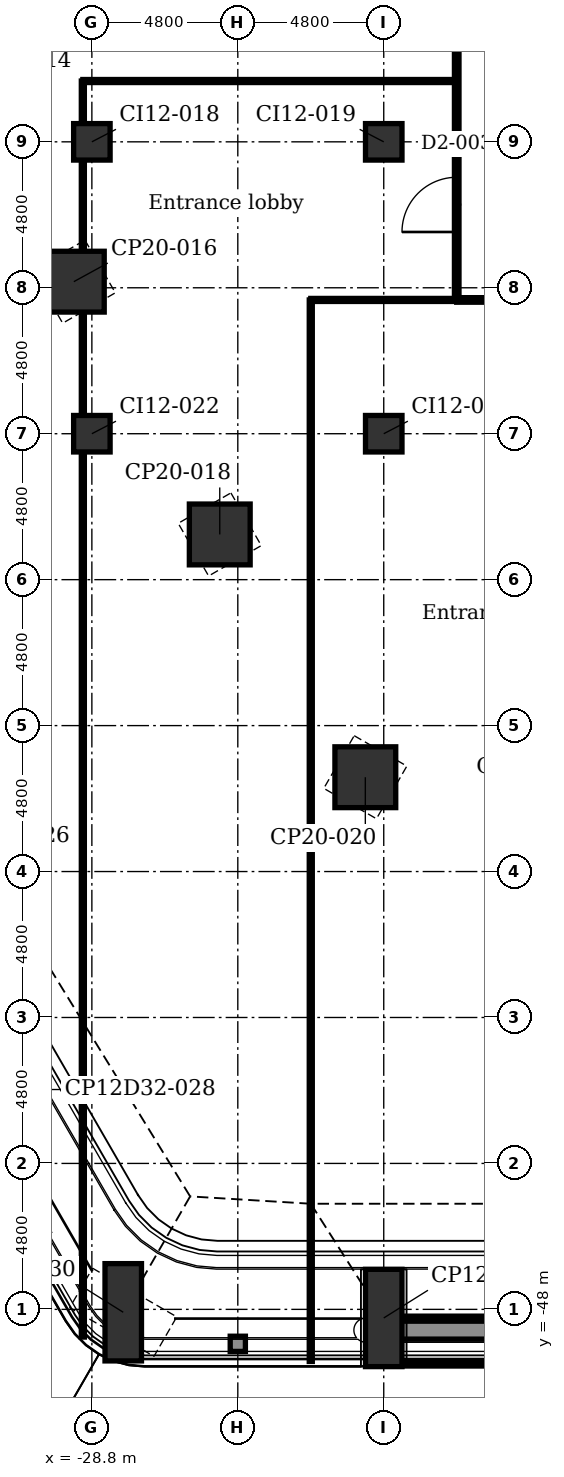
"""IFC4 building model, lengths in metres.
Left out: names, types, materials, properties, quantities, classifications, styles, units other than length and angle.
Written with IfcOpenShell. Run it as: python <this file> out.ifc"""

import sys

from ifc_helpers import new_model, si_unit, direction, frame, frame_2d, origin, origin_2d, place, context, subcontext, project, spatial, rectangle, extrude, element, fill, save


model = new_model("IFC4")
c1 = context("Model", 3, precision=1e-05, world=origin(), true_north=direction((0.0, 1.0)))
c2 = subcontext(c1, "Body", "Model", "MODEL_VIEW")
j1 = project(units=[si_unit("LENGTHUNIT", "METRE"), si_unit("PLANEANGLEUNIT", "RADIAN")], contexts=[c1])
p1 = place(None, origin())
s1 = spatial("IfcSite", under=j1, at=p1, CompositionType="ELEMENT")
p2 = place(p1, origin())
s2 = spatial("IfcBuilding", under=s1, at=p2, CompositionType="ELEMENT")
p3 = place(p2, origin())
s3 = spatial("IfcBuildingStorey", under=s2, at=p3, CompositionType="ELEMENT", Elevation=0.0)
for number, where, z_axis, x_axis in (
    (1, (-19.2, -48.283, -0.4), (0.0, 0.0, 1.0), (1.0, 0.0, 0.0)),
    (2, (-27.768, -48.095, -0.4), (0.0, 0.0, 1.0), (0.5, 0.866, 0.0)),
):
    element("IfcColumn", number, at=place(p3, frame(where, z_axis=z_axis, x_axis=x_axis)), inside=s3, PredefinedType="COLUMN", context=c2, shape_type="SweptSolid", body=[
        extrude(rectangle(XDim=1.2, YDim=3.2, at=origin_2d()), origin(), (0.0, 0.0, 1.0), 7.1),
    ])
for number, where, z_axis, x_axis in (
    (3, (-19.806, -30.498, -0.4), (0.0, 0.0, 1.0), (0.5, 0.866, 0.0)),
    (4, (-24.594, -22.513, -0.4), (0.0, 0.0, 1.0), (0.866, 0.5, 0.0)),
    (5, (-29.394, -14.199, -0.4), (0.0, 0.0, 1.0), (0.866, 0.5, 0.0)),
):
    element("IfcColumn", number, at=place(p3, frame(where, z_axis=z_axis, x_axis=x_axis)), inside=s3, PredefinedType="COLUMN", context=c2, shape_type="SweptSolid", body=[
        extrude(rectangle(XDim=2.0, YDim=2.0, at=origin_2d()), origin(), (0.0, 0.0, 1.0), 7.1),
    ])
for number, where, z_axis, x_axis in (
    (6, (-28.8, -19.2, -0.4), (0.0, 0.0, 1.0), (1.0, 0.0, 0.0)),
    (7, (-28.8, -9.6, -0.4), (0.0, 0.0, 1.0), (1.0, 0.0, 0.0)),
    (8, (-19.2, -19.2, -0.4), (0.0, 0.0, 1.0), (1.0, 0.0, 0.0)),
    (9, (-19.2, -9.6, -0.4), (0.0, 0.0, 1.0), (1.0, 0.0, 0.0)),
):
    element("IfcColumn", number, at=place(p3, frame(where, z_axis=z_axis, x_axis=x_axis)), inside=s3, PredefinedType="COLUMN", context=c2, shape_type="SweptSolid", body=[
        extrude(rectangle(XDim=1.2, YDim=1.2, at=origin_2d()), origin(), (0.0, 0.0, 1.0), 7.1),
    ])
p4 = place(p3, frame((-10.352, -48.303, 0.0), z_axis=(0.0, 0.0, 1.0), x_axis=(-1.0, 0.0, 0.0)))
e10 = element("IfcWall", 10, at=p4, inside=s3, PredefinedType="PARTITIONING", context=c2, shape_type="SweptSolid", body=[
    extrude(rectangle(XDim=8.246, YDim=0.16, at=frame_2d((4.123, 0.0))), origin(), (0.0, 0.0, 1.0), 6.7),
])
p5 = place(p4, frame((2.923, 0.0, 0.0)))
e11 = element("IfcOpeningElement", 11, at=p5, cuts=e10, PredefinedType="OPENING", context=c2, shape_type="SweptSolid", body=[
    extrude(rectangle(XDim=2.4, YDim=2.4, at=frame_2d((1.2, 1.2))), frame((0.0, 0.09, 0.0), z_axis=(0.0, -1.0, 0.0), x_axis=(1.0, 0.0, 0.0)), (0.0, 0.0, 1.0), 0.18),
])
p6 = place(p3, frame((-10.354, -49.783, 0.0), z_axis=(0.0, 0.0, 1.0), x_axis=(-1.0, 0.0, 0.0)))
e12 = element("IfcWall", 12, at=p6, inside=s3, PredefinedType="PARTITIONING", context=c2, shape_type="SweptSolid", body=[
    extrude(rectangle(XDim=8.242, YDim=0.16, at=frame_2d((4.121, 0.0))), origin(), (0.0, 0.0, 1.0), 6.7),
])
p7 = place(p6, frame((2.921, 0.0, 0.0)))
e13 = element("IfcOpeningElement", 13, at=p7, cuts=e12, PredefinedType="OPENING", context=c2, shape_type="SweptSolid", body=[
    extrude(rectangle(XDim=2.4, YDim=2.4, at=frame_2d((1.2, 1.2))), frame((0.0, 0.09, 0.0), z_axis=(0.0, -1.0, 0.0), x_axis=(1.0, 0.0, 0.0)), (0.0, 0.0, 1.0), 0.18),
])
p8 = place(p3, frame((-13.782, -48.683, 7.0), z_axis=(0.0, 0.0, 1.0), x_axis=(-1.0, 0.0, 0.0)))
e14 = element("IfcWall", 14, at=p8, inside=s3, PredefinedType="USERDEFINED", context=c2, shape_type="SweptSolid", body=[
    extrude(rectangle(XDim=6.0, YDim=0.6, at=frame_2d((3.0, 0.0))), origin(), (0.0, 0.0, 1.0), 0.7),
])
p9 = place(p3, frame((-23.75, -49.133, 0.0), z_axis=(0.0, 0.0, 1.0), x_axis=(-1.0, 0.0, 0.0)))
e15 = element("IfcWall", 15, at=p9, inside=s3, PredefinedType="SOLIDWALL", context=c2, shape_type="SweptSolid", body=[
    extrude(rectangle(XDim=0.5, YDim=0.5, at=frame_2d((0.25, 0.0))), origin(), (0.0, 0.0, 1.0), 6.4),
])
p10 = place(p3, frame((-16.8, -14.8, 0.0), z_axis=(0.0, 0.0, 1.0), x_axis=(0.0, 1.0, 0.0)))
e16 = element("IfcWall", 16, at=p10, inside=s3, PredefinedType="PARTITIONING", context=c2, shape_type="SweptSolid", body=[
    extrude(rectangle(XDim=10.85, YDim=0.15, at=frame_2d((5.425, 0.0))), origin(), (0.0, 0.0, 1.0), 6.7),
])
p11 = place(p10, frame((2.235, 0.0, 0.0)))
e17 = element("IfcOpeningElement", 17, at=p11, cuts=e16, PredefinedType="OPENING", context=c2, shape_type="SweptSolid", body=[
    extrude(rectangle(XDim=1.8, YDim=2.1, at=frame_2d((0.9, 1.05))), frame((0.0, 0.085, 0.0), z_axis=(0.0, -1.0, 0.0), x_axis=(1.0, 0.0, 0.0)), (0.0, 0.0, 1.0), 0.17),
])
p12 = place(p10, frame((8.6, 0.0, 0.0)))
e18 = element("IfcOpeningElement", 18, at=p12, cuts=e16, PredefinedType="OPENING", context=c2, shape_type="SweptSolid", body=[
    extrude(rectangle(XDim=1.0, YDim=2.1, at=frame_2d((0.5, 1.05))), frame((0.0, 0.085, 0.0), z_axis=(0.0, -1.0, 0.0), x_axis=(1.0, 0.0, 0.0)), (0.0, 0.0, 1.0), 0.17),
])
p13 = place(p3, frame((-21.6, -49.713, 0.0), z_axis=(0.0, 0.0, 1.0), x_axis=(0.0, 1.0, 0.0)))
e19 = element("IfcWall", 19, at=p13, inside=s3, PredefinedType="PARTITIONING", context=c2, shape_type="SweptSolid", body=[
    extrude(rectangle(XDim=34.913, YDim=0.1, at=frame_2d((17.457, 0.0))), origin(), (0.0, 0.0, 1.0), 6.7),
])
p14 = place(p3, frame((-29.097, -48.911, 0.0), z_axis=(0.0, 0.0, 1.0), x_axis=(0.0, 1.0, 0.0)))
e20 = element("IfcWall", 20, at=p14, inside=s3, PredefinedType="PARTITIONING", context=c2, shape_type="SweptSolid", body=[
    extrude(rectangle(XDim=41.311, YDim=0.1, at=frame_2d((20.655, 0.0))), origin(), (0.0, 0.0, 1.0), 6.7),
])
p15 = place(p3, frame((-21.6, -14.8, 0.0), z_axis=(0.0, 0.0, 1.0), x_axis=(1.0, 0.0, 0.0)))
e21 = element("IfcWall", 21, at=p15, inside=s3, PredefinedType="PARTITIONING", context=c2, shape_type="SweptSolid", body=[
    extrude(rectangle(XDim=4.8, YDim=0.1, at=frame_2d((2.4, 0.0))), origin(), (0.0, 0.0, 1.0), 6.7),
])
p16 = place(p3, frame((-16.8, -14.8, 0.0), z_axis=(0.0, 0.0, 1.0), x_axis=(1.0, 0.0, 0.0)))
e22 = element("IfcWall", 22, at=p16, inside=s3, PredefinedType="PARTITIONING", context=c2, shape_type="SweptSolid", body=[
    extrude(rectangle(XDim=33.6, YDim=0.15, at=frame_2d((16.8, 0.0))), origin(), (0.0, 0.0, 1.0), 6.7),
])
p17 = place(p16, frame((30.15, 0.0, 0.0)))
e23 = element("IfcOpeningElement", 23, at=p17, cuts=e22, PredefinedType="OPENING", context=c2, shape_type="SweptSolid", body=[
    extrude(rectangle(XDim=0.9, YDim=2.1, at=frame_2d((0.45, 1.05))), frame((0.0, 0.085, 0.0), z_axis=(0.0, -1.0, 0.0), x_axis=(1.0, 0.0, 0.0)), (0.0, 0.0, 1.0), 0.17),
])
p18 = place(p16, frame((32.55, 0.0, 0.0)))
e24 = element("IfcOpeningElement", 24, at=p18, cuts=e22, PredefinedType="OPENING", context=c2, shape_type="SweptSolid", body=[
    extrude(rectangle(XDim=0.9, YDim=2.1, at=frame_2d((0.45, 1.05))), frame((0.0, 0.085, 0.0), z_axis=(0.0, -1.0, 0.0), x_axis=(1.0, 0.0, 0.0)), (0.0, 0.0, 1.0), 0.17),
])
p19 = place(p16, frame((2.025, 0.0, 0.0)))
e25 = element("IfcOpeningElement", 25, at=p19, cuts=e22, PredefinedType="OPENING", context=c2, shape_type="SweptSolid", body=[
    extrude(rectangle(XDim=1.8, YDim=2.1, at=frame_2d((0.9, 1.05))), frame((0.0, 0.085, 0.0), z_axis=(0.0, -1.0, 0.0), x_axis=(1.0, 0.0, 0.0)), (0.0, 0.0, 1.0), 0.17),
])
p20 = place(p16, frame((11.775, 0.0, 0.0)))
e26 = element("IfcOpeningElement", 26, at=p20, cuts=e22, PredefinedType="OPENING", context=c2, shape_type="SweptSolid", body=[
    extrude(rectangle(XDim=1.8, YDim=2.1, at=frame_2d((0.9, 1.05))), frame((0.0, 0.085, 0.0), z_axis=(0.0, -1.0, 0.0), x_axis=(1.0, 0.0, 0.0)), (0.0, 0.0, 1.0), 0.17),
])
p21 = place(p16, frame((27.1, 0.0, 0.0)))
e27 = element("IfcOpeningElement", 27, at=p21, cuts=e22, PredefinedType="OPENING", context=c2, shape_type="SweptSolid", body=[
    extrude(rectangle(XDim=1.0, YDim=2.1, at=frame_2d((0.5, 1.05))), frame((0.0, 0.085, 0.0), z_axis=(0.0, -1.0, 0.0), x_axis=(1.0, 0.0, 0.0)), (0.0, 0.0, 1.0), 0.17),
])
p22 = place(p3, frame((-29.097, -7.6, 0.0), z_axis=(0.0, 0.0, 1.0), x_axis=(1.0, 0.0, 0.0)))
e28 = element("IfcWall", 28, at=p22, inside=s3, PredefinedType="PARTITIONING", context=c2, shape_type="SweptSolid", body=[
    extrude(rectangle(XDim=12.297, YDim=0.1, at=frame_2d((6.148, 0.0))), origin(), (0.0, 0.0, 1.0), 6.7),
])
p23 = place(p11, origin())
e29 = element("IfcDoor", 29, at=p23, inside=s3, OperationType="SINGLE_SWING_LEFT", PredefinedType="DOOR", context=c2, shape_type="SweptSolid", body=[
    extrude(rectangle(XDim=1.8, YDim=2.1, at=frame_2d((0.9, 1.05))), frame((0.0, 0.025, 0.0), z_axis=(0.0, -1.0, 0.0), x_axis=(1.0, 0.0, 0.0)), (0.0, 0.0, 1.0), 0.05),
])
fill(e17, e29)
save(model, sys.argv[1])
